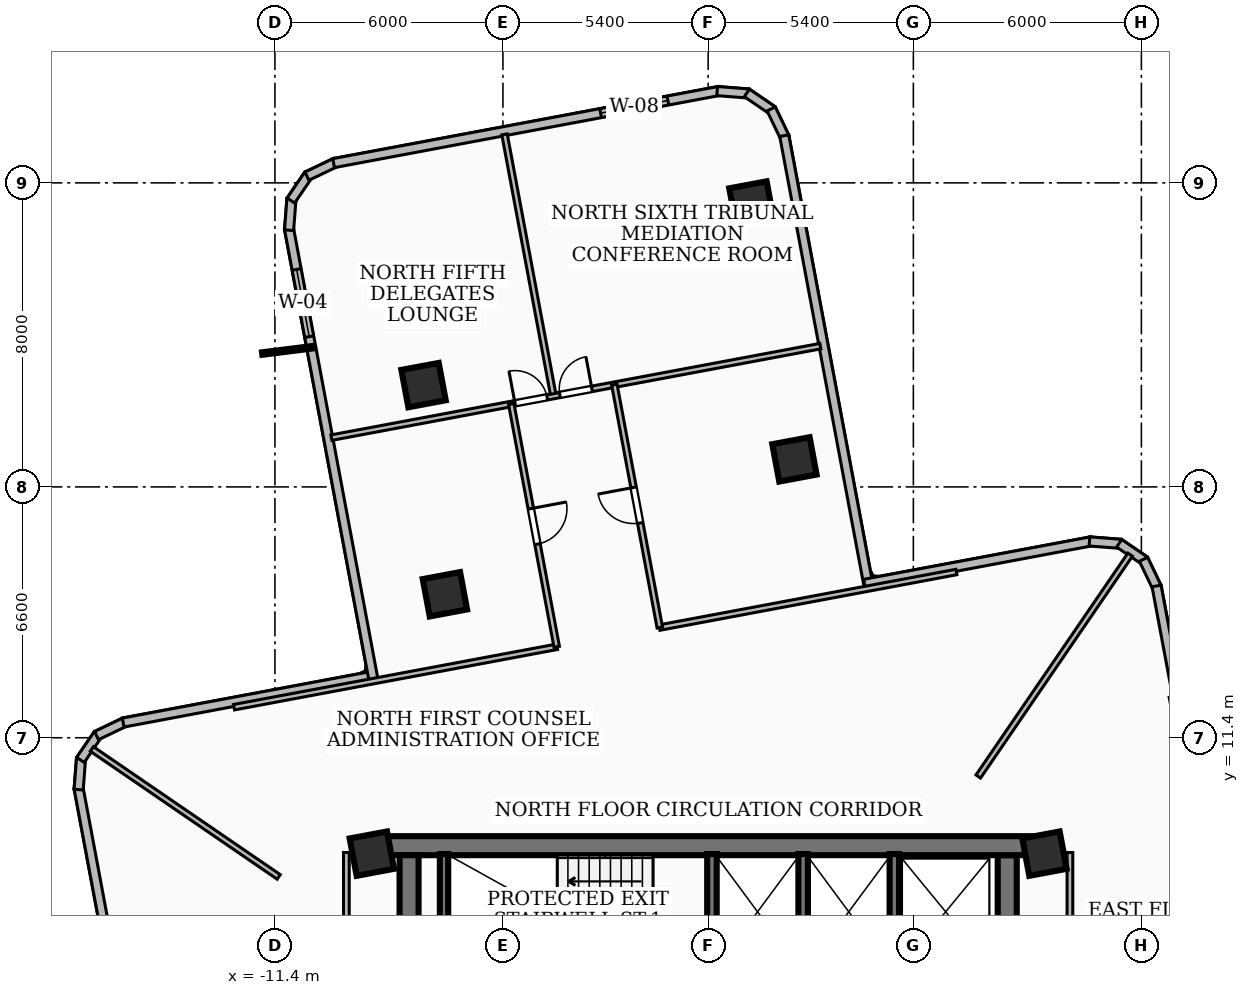
"""IFC4 building model, lengths in metres.
Left out: names, types, materials, properties, quantities, classifications, styles, units other than length and angle.
Written with IfcOpenShell. Run it as: python <this file> out.ifc"""

import sys

from ifc_helpers import new_model, si_unit, direction, frame, frame_2d, origin, origin_2d, place, context, subcontext, project, spatial, rectangle, extrude, element, fill, save


model = new_model("IFC4")
c1 = context("Model", 3, precision=1e-05, world=origin(), true_north=direction((0.0, 1.0)))
c2 = subcontext(c1, "Body", "Model", "MODEL_VIEW")
j1 = project(units=[si_unit("LENGTHUNIT", "METRE"), si_unit("PLANEANGLEUNIT", "RADIAN")], contexts=[c1])
p1 = place(None, origin())
s1 = spatial("IfcSite", under=j1, at=p1, CompositionType="ELEMENT")
p2 = place(p1, origin())
s2 = spatial("IfcBuilding", under=s1, at=p2, CompositionType="ELEMENT")
p3 = place(p2, frame((0.0, 0.0, 100.08)))
s3 = spatial("IfcBuildingStorey", under=s2, at=p3, CompositionType="ELEMENT", Elevation=100.08)
p4 = place(p3, frame((-8.78, 8.56, 0.0), z_axis=(0.0, 0.0, 1.0), x_axis=(1.0, 0.0, 0.0)))
e1 = element("IfcWall", 1, at=p4, inside=s3, PredefinedType="SHEAR", context=c2, shape_type="SweptSolid", body=[
    extrude(rectangle(XDim=17.56, YDim=0.5, at=frame_2d((8.78, 0.0))), origin(), (0.0, 0.0, 1.0), 3.34),
])
for number, where, z_axis, x_axis in (
    (2, (-7.87, 2.0, 0.0), (0.0, 0.0, 1.0), (0.0, 1.0, 0.0)),
    (3, (7.87, 8.31, 0.0), (0.0, 0.0, 1.0), (0.0, -1.0, 0.0)),
):
    element("IfcWall", number, at=place(p3, frame(where, z_axis=z_axis, x_axis=x_axis)), inside=s3, PredefinedType="SHEAR", context=c2, shape_type="SweptSolid", body=[
        extrude(rectangle(XDim=6.31, YDim=0.5, at=frame_2d((3.155, 0.0))), origin(), (0.0, 0.0, 1.0), 3.34),
    ])
p5 = place(p3, frame((-6.95, 5.28, 0.0), z_axis=(0.0, 0.0, 1.0), x_axis=(0.0, 1.0, 0.0)))
e4 = element("IfcWall", 4, at=p5, inside=s3, PredefinedType="SOLIDWALL", context=c2, shape_type="SweptSolid", body=[
    extrude(rectangle(XDim=3.06, YDim=0.22, at=frame_2d((1.53, 0.0))), origin(), (0.0, 0.0, 1.0), 3.34),
])
for number, where, z_axis, x_axis in (
    (5, (0.1, 5.3, 0.0), (0.0, 0.0, 1.0), (0.0, 1.0, 0.0)),
    (6, (2.5, 5.3, 0.0), (0.0, 0.0, 1.0), (0.0, 1.0, 0.0)),
    (7, (4.9, 5.3, 0.0), (0.0, 0.0, 1.0), (0.0, 1.0, 0.0)),
):
    element("IfcWall", number, at=place(p3, frame(where, z_axis=z_axis, x_axis=x_axis)), inside=s3, PredefinedType="SOLIDWALL", context=c2, shape_type="SweptSolid", body=[
        extrude(rectangle(XDim=3.04, YDim=0.25, at=frame_2d((1.52, 0.0))), origin(), (0.0, 0.0, 1.0), 3.34),
    ])
for number, where, z_axis, x_axis in (
    (8, (-8.85, 8.35, 0.0), (0.0, 0.0, 1.0), (0.983, 0.184, 0.0)),
    (9, (8.85, 8.35, 0.0), (0.0, 0.0, 1.0), (0.983, 0.184, 0.0)),
    (10, (2.271, 18.724, 0.0), (0.0, 0.0, 1.0), (0.983, 0.184, 0.0)),
    (11, (-6.927, 15.175, 0.0), (0.0, 0.0, 1.0), (0.983, 0.184, 0.0)),
    (12, (1.139, 25.457, 0.0), (0.0, 0.0, 1.0), (0.983, 0.184, 0.0)),
    (13, (-7.489, 20.679, 0.0), (0.0, 0.0, 1.0), (0.983, 0.184, 0.0)),
):
    element("IfcColumn", number, at=place(p3, frame(where, z_axis=z_axis, x_axis=x_axis)), inside=s3, PredefinedType="COLUMN", context=c2, shape_type="SweptSolid", body=[
        extrude(rectangle(XDim=1.0, YDim=1.0, at=origin_2d()), origin(), (0.0, 0.0, 1.0), 3.6),
    ])
p6 = place(p3, frame((-15.45, 4.113, 0.0), z_axis=(0.0, 0.0, 1.0), x_axis=(-0.18406771587, 0.982913564854, 0.0)))
e14 = element("IfcWall", 14, at=p6, inside=s3, PredefinedType="SOLIDWALL", context=c2, shape_type="SweptSolid", body=[
    extrude(rectangle(XDim=6.075, YDim=0.24, at=frame_2d((3.037, 0.0))), origin(), (0.0, 0.0, 1.0), 3.34),
])
p7 = place(p3, frame((-16.565, 10.034, 0.0), z_axis=(0.0, 0.0, 1.0), x_axis=(0.077011179273, 0.997030229365, 0.0)))
e15 = element("IfcWall", 15, at=p7, inside=s3, PredefinedType="SOLIDWALL", context=c2, shape_type="SweptSolid", body=[
    extrude(rectangle(XDim=0.831, YDim=0.24, at=frame_2d((0.415, 0.0))), origin(), (0.0, 0.0, 1.0), 3.34),
])
p8 = place(p3, frame((-16.517, 10.816, 0.0), z_axis=(0.0, 0.0, 1.0), x_axis=(0.563941688624, 0.825814611055, 0.0)))
e16 = element("IfcWall", 16, at=p8, inside=s3, PredefinedType="SOLIDWALL", context=c2, shape_type="SweptSolid", body=[
    extrude(rectangle(XDim=0.814, YDim=0.24, at=frame_2d((0.407, 0.0))), origin(), (0.0, 0.0, 1.0), 3.34),
])
p9 = place(p3, frame((-16.095, 11.456, 0.0), z_axis=(0.0, 0.0, 1.0), x_axis=(0.902044756706, 0.431642510533, 0.0)))
e17 = element("IfcWall", 17, at=p9, inside=s3, PredefinedType="SOLIDWALL", context=c2, shape_type="SweptSolid", body=[
    extrude(rectangle(XDim=0.832, YDim=0.24, at=frame_2d((0.416, 0.0))), origin(), (0.0, 0.0, 1.0), 3.34),
])
p10 = place(p3, frame((-15.393, 11.799, 0.0), z_axis=(0.0, 0.0, 1.0), x_axis=(0.982891759821, 0.184184115697, 0.0)))
e18 = element("IfcWall", 18, at=p10, inside=s3, PredefinedType="SOLIDWALL", context=c2, shape_type="SweptSolid", body=[
    extrude(rectangle(XDim=6.776, YDim=0.24, at=frame_2d((3.388, 0.0))), origin(), (0.0, 0.0, 1.0), 3.34),
])
p11 = place(p3, frame((-8.809, 12.935, 0.0), z_axis=(0.0, 0.0, 1.0), x_axis=(-0.184008977601, 0.982924562803, 0.0)))
e19 = element("IfcWall", 19, at=p11, inside=s3, PredefinedType="SOLIDWALL", context=c2, shape_type="SweptSolid", body=[
    extrude(rectangle(XDim=12.075, YDim=0.24, at=frame_2d((6.038, 0.0))), origin(), (0.0, 0.0, 1.0), 3.34),
])
p12 = place(p11, frame((9.175, 0.0, 0.85)))
e20 = element("IfcOpeningElement", 20, at=p12, cuts=e19, PredefinedType="OPENING", context=c2, shape_type="SweptSolid", body=[
    extrude(rectangle(XDim=1.8, YDim=2.0, at=frame_2d((0.9, 1.0))), frame((0.0, 0.13, 0.0), z_axis=(0.0, -1.0, 0.0), x_axis=(1.0, 0.0, 0.0)), (0.0, 0.0, 1.0), 0.26),
])
p13 = place(p3, frame((-11.028, 24.754, 0.0), z_axis=(0.0, 0.0, 1.0), x_axis=(0.077011179273, 0.997030229365, 0.0)))
e21 = element("IfcWall", 21, at=p13, inside=s3, PredefinedType="SOLIDWALL", context=c2, shape_type="SweptSolid", body=[
    extrude(rectangle(XDim=0.831, YDim=0.24, at=frame_2d((0.415, 0.0))), origin(), (0.0, 0.0, 1.0), 3.34),
])
p14 = place(p3, frame((-10.98, 25.536, 0.0), z_axis=(0.0, 0.0, 1.0), x_axis=(0.563941688624, 0.825814611055, 0.0)))
e22 = element("IfcWall", 22, at=p14, inside=s3, PredefinedType="SOLIDWALL", context=c2, shape_type="SweptSolid", body=[
    extrude(rectangle(XDim=0.814, YDim=0.24, at=frame_2d((0.407, 0.0))), origin(), (0.0, 0.0, 1.0), 3.34),
])
p15 = place(p3, frame((-10.558, 26.176, 0.0), z_axis=(0.0, 0.0, 1.0), x_axis=(0.902044756706, 0.431642510533, 0.0)))
e23 = element("IfcWall", 23, at=p15, inside=s3, PredefinedType="SOLIDWALL", context=c2, shape_type="SweptSolid", body=[
    extrude(rectangle(XDim=0.832, YDim=0.24, at=frame_2d((0.416, 0.0))), origin(), (0.0, 0.0, 1.0), 3.34),
])
p16 = place(p3, frame((-9.856, 26.519, 0.0), z_axis=(0.0, 0.0, 1.0), x_axis=(0.982923037919, 0.184017122922, 0.0)))
e24 = element("IfcWall", 24, at=p16, inside=s3, PredefinedType="SOLIDWALL", context=c2, shape_type="SweptSolid", body=[
    extrude(rectangle(XDim=10.319, YDim=0.24, at=frame_2d((5.16, 0.0))), origin(), (0.0, 0.0, 1.0), 3.34),
])
p17 = place(p16, frame((7.149, 0.0, 0.85)))
e25 = element("IfcOpeningElement", 25, at=p17, cuts=e24, PredefinedType="OPENING", context=c2, shape_type="SweptSolid", body=[
    extrude(rectangle(XDim=1.8, YDim=1.8, at=frame_2d((0.9, 0.9))), frame((0.0, 0.13, 0.0), z_axis=(0.0, -1.0, 0.0), x_axis=(1.0, 0.0, 0.0)), (0.0, 0.0, 1.0), 0.26),
])
p18 = place(p3, frame((0.237, 28.415, 0.0), z_axis=(0.0, 0.0, 1.0), x_axis=(0.997028485347, -0.077033754987, 0.0)))
e26 = element("IfcWall", 26, at=p18, inside=s3, PredefinedType="SOLIDWALL", context=c2, shape_type="SweptSolid", body=[
    extrude(rectangle(XDim=0.83, YDim=0.24, at=frame_2d((0.415, 0.0))), origin(), (0.0, 0.0, 1.0), 3.34),
])
p19 = place(p3, frame((1.019, 28.367, 0.0), z_axis=(0.0, 0.0, 1.0), x_axis=(0.825719176392, -0.564081414105, 0.0)))
e27 = element("IfcWall", 27, at=p19, inside=s3, PredefinedType="SOLIDWALL", context=c2, shape_type="SweptSolid", body=[
    extrude(rectangle(XDim=0.814, YDim=0.24, at=frame_2d((0.407, 0.0))), origin(), (0.0, 0.0, 1.0), 3.34),
])
p20 = place(p3, frame((1.659, 27.945, 0.0), z_axis=(0.0, 0.0, 1.0), x_axis=(0.431881390908, -0.901930409836, 0.0)))
e28 = element("IfcWall", 28, at=p20, inside=s3, PredefinedType="SOLIDWALL", context=c2, shape_type="SweptSolid", body=[
    extrude(rectangle(XDim=0.832, YDim=0.24, at=frame_2d((0.416, 0.0))), origin(), (0.0, 0.0, 1.0), 3.34),
])
p21 = place(p3, frame((2.002, 27.243, 0.0), z_axis=(0.0, 0.0, 1.0), x_axis=(0.184106644671, -0.982906273959, 0.0)))
e29 = element("IfcWall", 29, at=p21, inside=s3, PredefinedType="SOLIDWALL", context=c2, shape_type="SweptSolid", body=[
    extrude(rectangle(XDim=12.075, YDim=0.24, at=frame_2d((6.038, 0.0))), origin(), (0.0, 0.0, 1.0), 2.486),
])
p22 = place(p3, frame((4.113, 15.45, 0.0), z_axis=(0.0, 0.0, 1.0), x_axis=(0.982913564854, 0.18406771587, 0.0)))
e30 = element("IfcWall", 30, at=p22, inside=s3, PredefinedType="SOLIDWALL", context=c2, shape_type="SweptSolid", body=[
    extrude(rectangle(XDim=6.075, YDim=0.24, at=frame_2d((3.037, 0.0))), origin(), (0.0, 0.0, 1.0), 2.486),
])
p23 = place(p3, frame((10.034, 16.565, 0.0), z_axis=(0.0, 0.0, 1.0), x_axis=(0.997030229365, -0.077011179273, 0.0)))
e31 = element("IfcWall", 31, at=p23, inside=s3, PredefinedType="SOLIDWALL", context=c2, shape_type="SweptSolid", body=[
    extrude(rectangle(XDim=0.831, YDim=0.24, at=frame_2d((0.415, 0.0))), origin(), (0.0, 0.0, 1.0), 3.34),
])
p24 = place(p3, frame((10.816, 16.517, 0.0), z_axis=(0.0, 0.0, 1.0), x_axis=(0.825814611055, -0.563941688624, 0.0)))
e32 = element("IfcWall", 32, at=p24, inside=s3, PredefinedType="SOLIDWALL", context=c2, shape_type="SweptSolid", body=[
    extrude(rectangle(XDim=0.814, YDim=0.24, at=frame_2d((0.407, 0.0))), origin(), (0.0, 0.0, 1.0), 3.34),
])
p25 = place(p3, frame((11.456, 16.095, 0.0), z_axis=(0.0, 0.0, 1.0), x_axis=(0.431642510533, -0.902044756706, 0.0)))
e33 = element("IfcWall", 33, at=p25, inside=s3, PredefinedType="SOLIDWALL", context=c2, shape_type="SweptSolid", body=[
    extrude(rectangle(XDim=0.832, YDim=0.24, at=frame_2d((0.416, 0.0))), origin(), (0.0, 0.0, 1.0), 3.34),
])
p26 = place(p3, frame((11.799, 15.393, 0.0), z_axis=(0.0, 0.0, 1.0), x_axis=(0.184184115697, -0.982891759821, 0.0)))
e34 = element("IfcWall", 34, at=p26, inside=s3, PredefinedType="SOLIDWALL", context=c2, shape_type="SweptSolid", body=[
    extrude(rectangle(XDim=6.776, YDim=0.24, at=frame_2d((3.388, 0.0))), origin(), (0.0, 0.0, 1.0), 3.34),
])
for number, where, z_axis, x_axis in (
    (35, (-9.52, 1.75, 0.0), (0.0, 0.0, 1.0), (0.0, 1.0, 0.0)),
    (36, (9.52, 1.75, 0.0), (0.0, 0.0, 1.0), (0.0, 1.0, 0.0)),
):
    element("IfcWall", number, at=place(p3, frame(where, z_axis=z_axis, x_axis=x_axis)), inside=s3, PredefinedType="PARTITIONING", context=c2, shape_type="SweptSolid", body=[
        extrude(rectangle(XDim=6.63, YDim=0.15, at=frame_2d((3.315, 0.0))), origin(), (0.0, 0.0, 1.0), 2.486),
    ])
p27 = place(p3, frame((7.108, 10.38, 0.0), z_axis=(0.0, 0.0, 1.0), x_axis=(0.564900413187, 0.825159089619, 0.0)))
e37 = element("IfcWall", 37, at=p27, inside=s3, PredefinedType="PARTITIONING", context=c2, shape_type="SweptSolid", body=[
    extrude(rectangle(XDim=7.074, YDim=0.145, at=frame_2d((3.537, 0.0))), origin(), (0.0, 0.0, 1.0), 2.486),
])
p28 = place(p3, frame((-11.3, 7.738, 0.0), z_axis=(0.0, 0.0, 1.0), x_axis=(-0.825173577049, 0.564879250584, 0.0)))
e38 = element("IfcWall", 38, at=p28, inside=s3, PredefinedType="PARTITIONING", context=c2, shape_type="SweptSolid", body=[
    extrude(rectangle(XDim=5.959, YDim=0.145, at=frame_2d((2.979, 0.0))), origin(), (0.0, 0.0, 1.0), 3.34),
])
for number, where, z_axis, x_axis in (
    (39, (13.794, 3.975, 0.0), (0.0, 0.0, 1.0), (-0.184, 0.983, 0.0)),
    (40, (-3.975, 13.794, 0.0), (0.0, 0.0, 1.0), (-0.983, -0.184, 0.0)),
):
    element("IfcWall", number, at=place(p3, frame(where, z_axis=z_axis, x_axis=x_axis)), inside=s3, PredefinedType="PARTITIONING", context=c2, shape_type="SweptSolid", body=[
        extrude(rectangle(XDim=8.65, YDim=0.145, at=frame_2d((4.325, 0.0))), origin(), (0.0, 0.0, 1.0), 2.486),
    ])
p29 = place(p3, frame((6.532, 15.761, 0.0), z_axis=(0.0, 0.0, 1.0), x_axis=(-0.98292290903, -0.184017811376, 0.0)))
e41 = element("IfcWall", 41, at=p29, inside=s3, PredefinedType="PARTITIONING", context=c2, shape_type="SweptSolid", body=[
    extrude(rectangle(XDim=7.95, YDim=0.145, at=frame_2d((3.975, 0.0))), origin(), (0.0, 0.0, 1.0), 2.486),
])
p30 = place(p3, frame((-5.181, 20.181, 0.0), z_axis=(0.0, 0.0, 1.0), x_axis=(0.183973297475, -0.982931241652, 0.0)))
e42 = element("IfcWall", 42, at=p30, inside=s3, PredefinedType="PARTITIONING", context=c2, shape_type="SweptSolid", body=[
    extrude(rectangle(XDim=6.5, YDim=0.145, at=frame_2d((3.25, 0.0))), origin(), (0.0, 0.0, 1.0), 3.34),
])
p31 = place(p30, frame((2.8, 0.0, 0.0)))
e43 = element("IfcOpeningElement", 43, at=p31, cuts=e42, PredefinedType="OPENING", context=c2, shape_type="SweptSolid", body=[
    extrude(rectangle(XDim=0.95, YDim=2.08, at=frame_2d((0.475, 1.04))), frame((0.0, 0.083, 0.0), z_axis=(0.0, -1.0, 0.0), x_axis=(1.0, 0.0, 0.0)), (0.0, 0.0, 1.0), 0.165),
])
p32 = place(p3, frame((-1.272, 14.3, 0.0), z_axis=(0.0, 0.0, 1.0), x_axis=(-0.184009586708, 0.982924448775, 0.0)))
e44 = element("IfcWall", 44, at=p32, inside=s3, PredefinedType="PARTITIONING", context=c2, shape_type="SweptSolid", body=[
    extrude(rectangle(XDim=6.5, YDim=0.145, at=frame_2d((3.25, 0.0))), origin(), (0.0, 0.0, 1.0), 3.34),
])
p33 = place(p32, frame((2.8, 0.0, 0.0)))
e45 = element("IfcOpeningElement", 45, at=p33, cuts=e44, PredefinedType="OPENING", context=c2, shape_type="SweptSolid", body=[
    extrude(rectangle(XDim=0.95, YDim=2.08, at=frame_2d((0.475, 1.04))), frame((0.0, 0.083, 0.0), z_axis=(0.0, -1.0, 0.0), x_axis=(1.0, 0.0, 0.0)), (0.0, 0.0, 1.0), 0.165),
])
p34 = place(p3, frame((-4.081, 20.448, 0.0), z_axis=(0.0, 0.0, 1.0), x_axis=(-0.18384493789, 0.982955257787, 0.0)))
e46 = element("IfcWall", 46, at=p34, inside=s3, PredefinedType="PARTITIONING", context=c2, shape_type="SweptSolid", body=[
    extrude(rectangle(XDim=6.945, YDim=0.145, at=frame_2d((3.473, 0.0))), origin(), (0.0, 0.0, 1.0), 2.832),
])
p35 = place(p3, frame((-9.914, 19.296, 0.0), z_axis=(0.0, 0.0, 1.0), x_axis=(0.982932308489, 0.183967597498, 0.0)))
e47 = element("IfcWall", 47, at=p35, inside=s3, PredefinedType="PARTITIONING", context=c2, shape_type="SweptSolid", body=[
    extrude(rectangle(XDim=13.09, YDim=0.145, at=frame_2d((6.545, 0.0))), origin(), (0.0, 0.0, 1.0), 2.486),
])
p36 = place(p35, frame((6.115, 0.0, 0.0)))
e48 = element("IfcOpeningElement", 48, at=p36, cuts=e47, PredefinedType="OPENING", context=c2, shape_type="SweptSolid", body=[
    extrude(rectangle(XDim=0.86, YDim=2.04, at=frame_2d((0.43, 1.02))), frame((0.0, 0.083, 0.0), z_axis=(0.0, -1.0, 0.0), x_axis=(1.0, 0.0, 0.0)), (0.0, 0.0, 1.0), 0.165),
])
p37 = place(p35, frame((4.915, 0.0, 0.0)))
e49 = element("IfcOpeningElement", 49, at=p37, cuts=e47, PredefinedType="OPENING", context=c2, shape_type="SweptSolid", body=[
    extrude(rectangle(XDim=0.86, YDim=2.04, at=frame_2d((0.43, 1.02))), frame((0.0, 0.083, 0.0), z_axis=(0.0, -1.0, 0.0), x_axis=(1.0, 0.0, 0.0)), (0.0, 0.0, 1.0), 0.165),
])
p38 = place(p12, origin())
e50 = element("IfcWindow", 50, at=p38, inside=s3, PartitioningType="SINGLE_PANEL", PredefinedType="WINDOW", context=c2, shape_type="SweptSolid", body=[
    extrude(rectangle(XDim=1.8, YDim=2.0, at=frame_2d((0.9, 1.0))), frame((0.0, 0.03, 0.0), z_axis=(0.0, -1.0, 0.0), x_axis=(1.0, 0.0, 0.0)), (0.0, 0.0, 1.0), 0.06),
])
fill(e20, e50)
p39 = place(p17, origin())
e51 = element("IfcWindow", 51, at=p39, inside=s3, PartitioningType="SINGLE_PANEL", PredefinedType="WINDOW", context=c2, shape_type="SweptSolid", body=[
    extrude(rectangle(XDim=1.8, YDim=1.8, at=frame_2d((0.9, 0.9))), frame((0.0, 0.03, 0.0), z_axis=(0.0, -1.0, 0.0), x_axis=(1.0, 0.0, 0.0)), (0.0, 0.0, 1.0), 0.06),
])
fill(e25, e51)
p40 = place(p31, origin())
e52 = element("IfcDoor", 52, at=p40, inside=s3, OperationType="SINGLE_SWING_LEFT", PredefinedType="DOOR", context=c2, shape_type="SweptSolid", body=[
    extrude(rectangle(XDim=0.95, YDim=2.08, at=frame_2d((0.475, 1.04))), frame((0.0, 0.025, 0.0), z_axis=(0.0, -1.0, 0.0), x_axis=(1.0, 0.0, 0.0)), (0.0, 0.0, 1.0), 0.05),
])
fill(e43, e52)
p41 = place(p33, origin())
e53 = element("IfcDoor", 53, at=p41, inside=s3, OperationType="SINGLE_SWING_RIGHT", PredefinedType="DOOR", context=c2, shape_type="SweptSolid", body=[
    extrude(rectangle(XDim=0.95, YDim=2.08, at=frame_2d((0.475, 1.04))), frame((0.0, 0.025, 0.0), z_axis=(0.0, -1.0, 0.0), x_axis=(1.0, 0.0, 0.0)), (0.0, 0.0, 1.0), 0.05),
])
fill(e45, e53)
p42 = place(p36, origin())
e54 = element("IfcDoor", 54, at=p42, inside=s3, OperationType="SINGLE_SWING_RIGHT", PredefinedType="DOOR", context=c2, shape_type="SweptSolid", body=[
    extrude(rectangle(XDim=0.86, YDim=2.04, at=frame_2d((0.43, 1.02))), frame((0.0, 0.025, 0.0), z_axis=(0.0, -1.0, 0.0), x_axis=(1.0, 0.0, 0.0)), (0.0, 0.0, 1.0), 0.05),
])
fill(e48, e54)
p43 = place(p37, origin())
e55 = element("IfcDoor", 55, at=p43, inside=s3, OperationType="SINGLE_SWING_LEFT", PredefinedType="DOOR", context=c2, shape_type="SweptSolid", body=[
    extrude(rectangle(XDim=0.86, YDim=2.04, at=frame_2d((0.43, 1.02))), frame((0.0, 0.025, 0.0), z_axis=(0.0, -1.0, 0.0), x_axis=(1.0, 0.0, 0.0)), (0.0, 0.0, 1.0), 0.05),
])
fill(e49, e55)
save(model, sys.argv[1])
